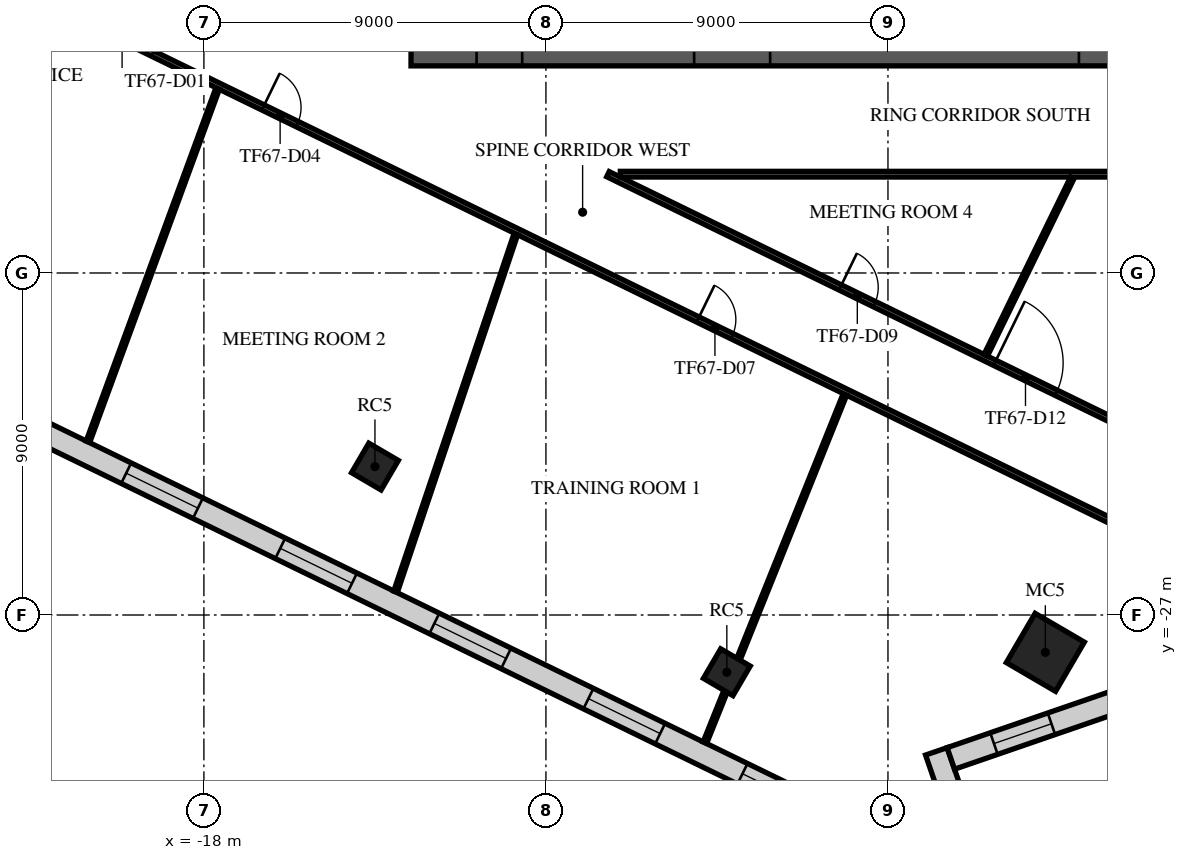
"""IFC4 building model, lengths in metres.
Left out: names, types, materials, properties, quantities, classifications, styles, units other than length and angle.
Written with IfcOpenShell. Run it as: python <this file> out.ifc"""

import sys

from ifc_helpers import new_model, si_unit, direction, frame, frame_2d, origin, origin_2d, place, context, subcontext, project, spatial, rectangle, extrude, element, fill, save


model = new_model("IFC4")
c1 = context("Model", 3, precision=1e-05, world=origin(), true_north=direction((0.0, 1.0)))
c2 = subcontext(c1, "Body", "Model", "MODEL_VIEW")
j1 = project(units=[si_unit("LENGTHUNIT", "METRE"), si_unit("PLANEANGLEUNIT", "RADIAN")], contexts=[c1])
p1 = place(None, origin())
s1 = spatial("IfcSite", under=j1, at=p1, CompositionType="ELEMENT")
p2 = place(p1, origin())
s2 = spatial("IfcBuilding", under=s1, at=p2, CompositionType="ELEMENT")
p3 = place(p2, frame((0.0, 0.0, 282.9)))
s3 = spatial("IfcBuildingStorey", under=s2, at=p3, CompositionType="ELEMENT", Elevation=282.9)
for number, where, z_axis, x_axis in (
    (1, (-13.499, -23.094, 0.0), (0.0, 0.0, 1.0), (0.505, 0.863, 0.0)),
    (2, (-4.24, -28.506, 0.0), (0.0, 0.0, 1.0), (0.505, 0.863, 0.0)),
):
    element("IfcColumn", number, at=place(p3, frame(where, z_axis=z_axis, x_axis=x_axis)), inside=s3, PredefinedType="COLUMN", context=c2, shape_type="SweptSolid", body=[
        extrude(rectangle(XDim=0.9, YDim=0.9, at=origin_2d()), origin(), (0.0, 0.0, 1.0), 4.0),
    ])
p4 = place(p3, frame((4.141, -27.983, 0.0), z_axis=(0.0, 0.0, 1.0), x_axis=(0.504643651291, 0.863327739165, 0.0)))
e3 = element("IfcColumn", 3, at=p4, inside=s3, PredefinedType="COLUMN", context=c2, shape_type="SweptSolid", body=[
    extrude(rectangle(XDim=1.5, YDim=1.5, at=origin_2d()), origin(), (0.0, 0.0, 1.0), 4.0),
])
p5 = place(p3, frame((-12.55, -12.175, 0.0), z_axis=(0.0, 0.0, 1.0), x_axis=(1.0, 0.0, 0.0)))
e4 = element("IfcWall", 4, at=p5, inside=s3, PredefinedType="SHEAR", context=c2, shape_type="SweptSolid", body=[
    extrude(rectangle(XDim=25.1, YDim=0.75, at=frame_2d((12.55, 0.0))), origin(), (0.0, 0.0, 1.0), 3.64),
])
p6 = place(p5, frame((7.45, 0.0, 0.0)))
e5 = element("IfcOpeningElement", 5, at=p6, cuts=e4, PredefinedType="OPENING", context=c2, shape_type="SweptSolid", body=[
    extrude(rectangle(XDim=2.0, YDim=2.1, at=frame_2d((1.0, 1.05))), frame((0.0, 0.385, 0.0), z_axis=(0.0, -1.0, 0.0), x_axis=(1.0, 0.0, 0.0)), (0.0, 0.0, 1.0), 0.77),
])
p7 = place(p5, frame((17.575, 0.0, 0.0)))
e6 = element("IfcOpeningElement", 6, at=p7, cuts=e4, PredefinedType="OPENING", context=c2, shape_type="SweptSolid", body=[
    extrude(rectangle(XDim=1.2, YDim=2.1, at=frame_2d((0.6, 1.05))), frame((0.0, 0.385, 0.0), z_axis=(0.0, -1.0, 0.0), x_axis=(1.0, 0.0, 0.0)), (0.0, 0.0, 1.0), 0.77),
])
p8 = place(p5, frame((1.725, 0.0, 0.0)))
e7 = element("IfcOpeningElement", 7, at=p8, cuts=e4, PredefinedType="OPENING", context=c2, shape_type="SweptSolid", body=[
    extrude(rectangle(XDim=1.2, YDim=2.1, at=frame_2d((0.6, 1.05))), frame((0.0, 0.385, 0.0), z_axis=(0.0, -1.0, 0.0), x_axis=(1.0, 0.0, 0.0)), (0.0, 0.0, 1.0), 0.77),
])
p9 = place(p5, frame((22.175, 0.0, 0.0)))
e8 = element("IfcOpeningElement", 8, at=p9, cuts=e4, PredefinedType="OPENING", context=c2, shape_type="SweptSolid", body=[
    extrude(rectangle(XDim=1.2, YDim=2.1, at=frame_2d((0.6, 1.05))), frame((0.0, 0.385, 0.0), z_axis=(0.0, -1.0, 0.0), x_axis=(1.0, 0.0, 0.0)), (0.0, 0.0, 1.0), 0.77),
])
p10 = place(p3, frame((-29.237, -18.785, 0.0), z_axis=(0.0, 0.0, 1.0), x_axis=(0.898796077823, -0.438366981524, 0.0)))
e9 = element("IfcWall", 9, at=p10, inside=s3, PredefinedType="STANDARD", context=c2, shape_type="SweptSolid", body=[
    extrude(rectangle(XDim=36.086, YDim=0.6, at=frame_2d((18.043, 0.0))), origin(), (0.0, 0.0, 1.0), 3.64),
])
p11 = place(p10, frame((1.205, 0.0, 0.9)))
e10 = element("IfcOpeningElement", 10, at=p11, cuts=e9, PredefinedType="OPENING", context=c2, shape_type="SweptSolid", body=[
    extrude(rectangle(XDim=2.1, YDim=2.1, at=frame_2d((1.05, 1.05))), frame((0.0, 0.31, 0.0), z_axis=(0.0, -1.0, 0.0), x_axis=(1.0, 0.0, 0.0)), (0.0, 0.0, 1.0), 0.62),
])
p12 = place(p10, frame((5.716, 0.0, 0.9)))
e11 = element("IfcOpeningElement", 11, at=p12, cuts=e9, PredefinedType="OPENING", context=c2, shape_type="SweptSolid", body=[
    extrude(rectangle(XDim=2.1, YDim=2.1, at=frame_2d((1.05, 1.05))), frame((0.0, 0.31, 0.0), z_axis=(0.0, -1.0, 0.0), x_axis=(1.0, 0.0, 0.0)), (0.0, 0.0, 1.0), 0.62),
])
p13 = place(p10, frame((10.227, 0.0, 0.9)))
e12 = element("IfcOpeningElement", 12, at=p13, cuts=e9, PredefinedType="OPENING", context=c2, shape_type="SweptSolid", body=[
    extrude(rectangle(XDim=2.1, YDim=2.1, at=frame_2d((1.05, 1.05))), frame((0.0, 0.31, 0.0), z_axis=(0.0, -1.0, 0.0), x_axis=(1.0, 0.0, 0.0)), (0.0, 0.0, 1.0), 0.62),
])
p14 = place(p10, frame((14.738, 0.0, 0.9)))
e13 = element("IfcOpeningElement", 13, at=p14, cuts=e9, PredefinedType="OPENING", context=c2, shape_type="SweptSolid", body=[
    extrude(rectangle(XDim=2.1, YDim=2.1, at=frame_2d((1.05, 1.05))), frame((0.0, 0.31, 0.0), z_axis=(0.0, -1.0, 0.0), x_axis=(1.0, 0.0, 0.0)), (0.0, 0.0, 1.0), 0.62),
])
p15 = place(p10, frame((19.249, 0.0, 0.9)))
e14 = element("IfcOpeningElement", 14, at=p15, cuts=e9, PredefinedType="OPENING", context=c2, shape_type="SweptSolid", body=[
    extrude(rectangle(XDim=2.1, YDim=2.1, at=frame_2d((1.05, 1.05))), frame((0.0, 0.31, 0.0), z_axis=(0.0, -1.0, 0.0), x_axis=(1.0, 0.0, 0.0)), (0.0, 0.0, 1.0), 0.62),
])
p16 = place(p10, frame((23.759, 0.0, 0.9)))
e15 = element("IfcOpeningElement", 15, at=p16, cuts=e9, PredefinedType="OPENING", context=c2, shape_type="SweptSolid", body=[
    extrude(rectangle(XDim=2.1, YDim=2.1, at=frame_2d((1.05, 1.05))), frame((0.0, 0.31, 0.0), z_axis=(0.0, -1.0, 0.0), x_axis=(1.0, 0.0, 0.0)), (0.0, 0.0, 1.0), 0.62),
])
p17 = place(p10, frame((28.27, 0.0, 0.9)))
e16 = element("IfcOpeningElement", 16, at=p17, cuts=e9, PredefinedType="OPENING", context=c2, shape_type="SweptSolid", body=[
    extrude(rectangle(XDim=2.1, YDim=2.1, at=frame_2d((1.05, 1.05))), frame((0.0, 0.31, 0.0), z_axis=(0.0, -1.0, 0.0), x_axis=(1.0, 0.0, 0.0)), (0.0, 0.0, 1.0), 0.62),
])
p18 = place(p10, frame((32.781, 0.0, 0.9)))
e17 = element("IfcOpeningElement", 17, at=p18, cuts=e9, PredefinedType="OPENING", context=c2, shape_type="SweptSolid", body=[
    extrude(rectangle(XDim=2.1, YDim=2.1, at=frame_2d((1.05, 1.05))), frame((0.0, 0.31, 0.0), z_axis=(0.0, -1.0, 0.0), x_axis=(1.0, 0.0, 0.0)), (0.0, 0.0, 1.0), 0.62),
])
p19 = place(p3, frame((2.782, -34.971, 0.0), z_axis=(0.0, 0.0, 1.0), x_axis=(-0.325534552764, 0.945530144922, 0.0)))
e18 = element("IfcWall", 18, at=p19, inside=s3, PredefinedType="STANDARD", context=c2, shape_type="SweptSolid", body=[
    extrude(rectangle(XDim=4.635, YDim=0.6, at=frame_2d((2.318, 0.0))), origin(), (0.0, 0.0, 1.0), 3.64),
])
p20 = place(p19, frame((1.218, 0.0, 0.9)))
e19 = element("IfcOpeningElement", 19, at=p20, cuts=e18, PredefinedType="OPENING", context=c2, shape_type="SweptSolid", body=[
    extrude(rectangle(XDim=1.6, YDim=2.1, at=frame_2d((0.8, 1.05))), frame((0.0, 0.31, 0.0), z_axis=(0.0, -1.0, 0.0), x_axis=(1.0, 0.0, 0.0)), (0.0, 0.0, 1.0), 0.62),
])
p21 = place(p3, frame((1.654, -30.774, 0.0), z_axis=(0.0, 0.0, 1.0), x_axis=(0.945512022477, 0.325587185483, 0.0)))
e20 = element("IfcWall", 20, at=p21, inside=s3, PredefinedType="STANDARD", context=c2, shape_type="SweptSolid", body=[
    extrude(rectangle(XDim=8.0, YDim=0.6, at=frame_2d((4.0, 0.0))), origin(), (0.0, 0.0, 1.0), 3.64),
])
p22 = place(p21, frame((1.2, 0.0, 0.9)))
e21 = element("IfcOpeningElement", 21, at=p22, cuts=e20, PredefinedType="OPENING", context=c2, shape_type="SweptSolid", body=[
    extrude(rectangle(XDim=1.6, YDim=2.1, at=frame_2d((0.8, 1.05))), frame((0.0, 0.31, 0.0), z_axis=(0.0, -1.0, 0.0), x_axis=(1.0, 0.0, 0.0)), (0.0, 0.0, 1.0), 0.62),
])
p23 = place(p21, frame((5.2, 0.0, 0.9)))
e22 = element("IfcOpeningElement", 22, at=p23, cuts=e20, PredefinedType="OPENING", context=c2, shape_type="SweptSolid", body=[
    extrude(rectangle(XDim=1.6, YDim=2.1, at=frame_2d((0.8, 1.05))), frame((0.0, 0.31, 0.0), z_axis=(0.0, -1.0, 0.0), x_axis=(1.0, 0.0, 0.0)), (0.0, 0.0, 1.0), 0.62),
])
p24 = place(p3, frame((-26.175, -8.898, 0.0), z_axis=(0.0, 0.0, 1.0), x_axis=(0.898795233888, -0.438368711864, 0.0)))
e23 = element("IfcWall", 23, at=p24, inside=s3, PredefinedType="PARTITIONING", context=c2, shape_type="SweptSolid", body=[
    extrude(rectangle(XDim=39.325, YDim=0.15, at=frame_2d((19.663, 0.0))), origin(), (0.0, 0.0, 1.0), 3.04),
])
p25 = place(p24, frame((5.8, 0.0, 0.0)))
e24 = element("IfcOpeningElement", 24, at=p25, cuts=e23, PredefinedType="OPENING", context=c2, shape_type="SweptSolid", body=[
    extrude(rectangle(XDim=1.8, YDim=2.1, at=frame_2d((0.9, 1.05))), frame((0.0, 0.085, 0.0), z_axis=(0.0, -1.0, 0.0), x_axis=(1.0, 0.0, 0.0)), (0.0, 0.0, 1.0), 0.17),
])
p26 = place(p24, frame((10.827, 0.0, 0.0)))
e25 = element("IfcOpeningElement", 25, at=p26, cuts=e23, PredefinedType="OPENING", context=c2, shape_type="SweptSolid", body=[
    extrude(rectangle(XDim=1.0, YDim=2.1, at=frame_2d((0.5, 1.05))), frame((0.0, 0.085, 0.0), z_axis=(0.0, -1.0, 0.0), x_axis=(1.0, 0.0, 0.0)), (0.0, 0.0, 1.0), 0.17),
])
p27 = place(p24, frame((23.556, 0.0, 0.0)))
e26 = element("IfcOpeningElement", 26, at=p27, cuts=e23, PredefinedType="OPENING", context=c2, shape_type="SweptSolid", body=[
    extrude(rectangle(XDim=1.0, YDim=2.1, at=frame_2d((0.5, 1.05))), frame((0.0, 0.085, 0.0), z_axis=(0.0, -1.0, 0.0), x_axis=(1.0, 0.0, 0.0)), (0.0, 0.0, 1.0), 0.17),
])
p28 = place(p3, frame((-7.368, -15.4, 0.0), z_axis=(0.0, 0.0, 1.0), x_axis=(0.898784749485, -0.438390207571, 0.0)))
e27 = element("IfcWall", 27, at=p28, inside=s3, PredefinedType="PARTITIONING", context=c2, shape_type="SweptSolid", body=[
    extrude(rectangle(XDim=19.572, YDim=0.15, at=frame_2d((9.786, 0.0))), origin(), (0.0, 0.0, 1.0), 3.04),
])
p29 = place(p28, frame((6.8, 0.0, 0.0)))
e28 = element("IfcOpeningElement", 28, at=p29, cuts=e27, PredefinedType="OPENING", context=c2, shape_type="SweptSolid", body=[
    extrude(rectangle(XDim=1.0, YDim=2.1, at=frame_2d((0.5, 1.05))), frame((0.0, 0.085, 0.0), z_axis=(0.0, -1.0, 0.0), x_axis=(1.0, 0.0, 0.0)), (0.0, 0.0, 1.0), 0.17),
])
p30 = place(p28, frame((11.324, 0.0, 0.0)))
e29 = element("IfcOpeningElement", 29, at=p30, cuts=e27, PredefinedType="OPENING", context=c2, shape_type="SweptSolid", body=[
    extrude(rectangle(XDim=1.8, YDim=2.1, at=frame_2d((0.9, 1.05))), frame((0.0, 0.085, 0.0), z_axis=(0.0, -1.0, 0.0), x_axis=(1.0, 0.0, 0.0)), (0.0, 0.0, 1.0), 0.17),
])
p31 = place(p3, frame((-7.043, -15.4, 0.0), z_axis=(0.0, 0.0, 1.0), x_axis=(1.0, 0.0, 0.0)))
e30 = element("IfcWall", 30, at=p31, inside=s3, PredefinedType="PARTITIONING", context=c2, shape_type="SweptSolid", body=[
    extrude(rectangle(XDim=22.443, YDim=0.15, at=frame_2d((11.222, 0.0))), origin(), (0.0, 0.0, 1.0), 3.24),
])
p32 = place(p3, frame((-21.051, -22.441, 0.0), z_axis=(0.0, 0.0, 1.0), x_axis=(0.344611208879, 0.938745500503, 0.0)))
e31 = element("IfcWall", 31, at=p32, inside=s3, PredefinedType="PARTITIONING", context=c2, shape_type="SweptSolid", body=[
    extrude(rectangle(XDim=9.898, YDim=0.1, at=frame_2d((4.949, 0.0))), origin(), (0.0, 0.0, 1.0), 3.04),
])
p33 = place(p3, frame((-12.957, -26.389, 0.0), z_axis=(0.0, 0.0, 1.0), x_axis=(0.318735029826, 0.947843858851, 0.0)))
e32 = element("IfcWall", 32, at=p33, inside=s3, PredefinedType="PARTITIONING", context=c2, shape_type="SweptSolid", body=[
    extrude(rectangle(XDim=9.928, YDim=0.1, at=frame_2d((4.964, 0.0))), origin(), (0.0, 0.0, 1.0), 3.04),
])
p34 = place(p3, frame((-4.817, -30.359, 0.0), z_axis=(0.0, 0.0, 1.0), x_axis=(0.373182072461, 0.927758126234, 0.0)))
e33 = element("IfcWall", 33, at=p34, inside=s3, PredefinedType="PARTITIONING", context=c2, shape_type="SweptSolid", body=[
    extrude(rectangle(XDim=1.456, YDim=0.1, at=frame_2d((0.728, 0.0))), origin(), (0.0, 0.0, 1.0), 3.64),
])
p35 = place(p3, frame((-3.934, -28.164, 0.0), z_axis=(0.0, 0.0, 1.0), x_axis=(0.373060891907, 0.92780686079, 0.0)))
e34 = element("IfcWall", 34, at=p35, inside=s3, PredefinedType="PARTITIONING", context=c2, shape_type="SweptSolid", body=[
    extrude(rectangle(XDim=7.508, YDim=0.1, at=frame_2d((3.754, 0.0))), origin(), (0.0, 0.0, 1.0), 3.24),
])
p36 = place(p3, frame((2.573, -20.166, 0.0), z_axis=(0.0, 0.0, 1.0), x_axis=(0.438298611435, 0.898829420532, 0.0)))
e35 = element("IfcWall", 35, at=p36, inside=s3, PredefinedType="PARTITIONING", context=c2, shape_type="SweptSolid", body=[
    extrude(rectangle(XDim=5.194, YDim=0.1, at=frame_2d((2.597, 0.0))), origin(), (0.0, 0.0, 1.0), 3.24),
])
p37 = place(p6, origin())
e36 = element("IfcDoor", 36, at=p37, inside=s3, OperationType="SINGLE_SWING_LEFT", PredefinedType="DOOR", context=c2, shape_type="SweptSolid", body=[
    extrude(rectangle(XDim=2.0, YDim=2.1, at=frame_2d((1.0, 1.05))), frame((0.0, 0.025, 0.0), z_axis=(0.0, -1.0, 0.0), x_axis=(1.0, 0.0, 0.0)), (0.0, 0.0, 1.0), 0.05),
])
fill(e5, e36)
p38 = place(p7, origin())
e37 = element("IfcDoor", 37, at=p38, inside=s3, OperationType="SINGLE_SWING_LEFT", PredefinedType="DOOR", context=c2, shape_type="SweptSolid", body=[
    extrude(rectangle(XDim=1.2, YDim=2.1, at=frame_2d((0.6, 1.05))), frame((0.0, 0.025, 0.0), z_axis=(0.0, -1.0, 0.0), x_axis=(1.0, 0.0, 0.0)), (0.0, 0.0, 1.0), 0.05),
])
fill(e6, e37)
p39 = place(p8, origin())
e38 = element("IfcDoor", 38, at=p39, inside=s3, OperationType="SINGLE_SWING_LEFT", PredefinedType="DOOR", context=c2, shape_type="SweptSolid", body=[
    extrude(rectangle(XDim=1.2, YDim=2.1, at=frame_2d((0.6, 1.05))), frame((0.0, 0.025, 0.0), z_axis=(0.0, -1.0, 0.0), x_axis=(1.0, 0.0, 0.0)), (0.0, 0.0, 1.0), 0.05),
])
fill(e7, e38)
p40 = place(p13, origin())
e39 = element("IfcWindow", 39, at=p40, inside=s3, PartitioningType="SINGLE_PANEL", PredefinedType="WINDOW", context=c2, shape_type="SweptSolid", body=[
    extrude(rectangle(XDim=2.1, YDim=2.1, at=frame_2d((1.05, 1.05))), frame((0.0, 0.03, 0.0), z_axis=(0.0, -1.0, 0.0), x_axis=(1.0, 0.0, 0.0)), (0.0, 0.0, 1.0), 0.06),
])
fill(e12, e39)
p41 = place(p14, origin())
e40 = element("IfcWindow", 40, at=p41, inside=s3, PartitioningType="SINGLE_PANEL", PredefinedType="WINDOW", context=c2, shape_type="SweptSolid", body=[
    extrude(rectangle(XDim=2.1, YDim=2.1, at=frame_2d((1.05, 1.05))), frame((0.0, 0.03, 0.0), z_axis=(0.0, -1.0, 0.0), x_axis=(1.0, 0.0, 0.0)), (0.0, 0.0, 1.0), 0.06),
])
fill(e13, e40)
p42 = place(p15, origin())
e41 = element("IfcWindow", 41, at=p42, inside=s3, PartitioningType="SINGLE_PANEL", PredefinedType="WINDOW", context=c2, shape_type="SweptSolid", body=[
    extrude(rectangle(XDim=2.1, YDim=2.1, at=frame_2d((1.05, 1.05))), frame((0.0, 0.03, 0.0), z_axis=(0.0, -1.0, 0.0), x_axis=(1.0, 0.0, 0.0)), (0.0, 0.0, 1.0), 0.06),
])
fill(e14, e41)
p43 = place(p16, origin())
e42 = element("IfcWindow", 42, at=p43, inside=s3, PartitioningType="SINGLE_PANEL", PredefinedType="WINDOW", context=c2, shape_type="SweptSolid", body=[
    extrude(rectangle(XDim=2.1, YDim=2.1, at=frame_2d((1.05, 1.05))), frame((0.0, 0.03, 0.0), z_axis=(0.0, -1.0, 0.0), x_axis=(1.0, 0.0, 0.0)), (0.0, 0.0, 1.0), 0.06),
])
fill(e15, e42)
p44 = place(p17, origin())
e43 = element("IfcWindow", 43, at=p44, inside=s3, PartitioningType="SINGLE_PANEL", PredefinedType="WINDOW", context=c2, shape_type="SweptSolid", body=[
    extrude(rectangle(XDim=2.1, YDim=2.1, at=frame_2d((1.05, 1.05))), frame((0.0, 0.03, 0.0), z_axis=(0.0, -1.0, 0.0), x_axis=(1.0, 0.0, 0.0)), (0.0, 0.0, 1.0), 0.06),
])
fill(e16, e43)
p45 = place(p22, origin())
e44 = element("IfcWindow", 44, at=p45, inside=s3, PartitioningType="SINGLE_PANEL", PredefinedType="WINDOW", context=c2, shape_type="SweptSolid", body=[
    extrude(rectangle(XDim=1.6, YDim=2.1, at=frame_2d((0.8, 1.05))), frame((0.0, 0.03, 0.0), z_axis=(0.0, -1.0, 0.0), x_axis=(1.0, 0.0, 0.0)), (0.0, 0.0, 1.0), 0.06),
])
fill(e21, e44)
p46 = place(p25, frame((1.8, 0.0, 0.0), z_axis=(0.0, 0.0, 1.0), x_axis=(-1.0, 0.0, 0.0)))
e45 = element("IfcDoor", 45, at=p46, inside=s3, OperationType="DOUBLE_DOOR_SINGLE_SWING", PredefinedType="DOOR", context=c2, shape_type="SweptSolid", body=[
    extrude(rectangle(XDim=1.8, YDim=2.1, at=frame_2d((0.9, 1.05))), frame((0.0, 0.025, 0.0), z_axis=(0.0, -1.0, 0.0), x_axis=(1.0, 0.0, 0.0)), (0.0, 0.0, 1.0), 0.05),
])
fill(e24, e45)
p47 = place(p26, frame((1.0, 0.0, 0.0), z_axis=(0.0, 0.0, 1.0), x_axis=(-1.0, 0.0, 0.0)))
e46 = element("IfcDoor", 46, at=p47, inside=s3, OperationType="SINGLE_SWING_RIGHT", PredefinedType="DOOR", context=c2, shape_type="SweptSolid", body=[
    extrude(rectangle(XDim=1.0, YDim=2.1, at=frame_2d((0.5, 1.05))), frame((0.0, 0.025, 0.0), z_axis=(0.0, -1.0, 0.0), x_axis=(1.0, 0.0, 0.0)), (0.0, 0.0, 1.0), 0.05),
])
fill(e25, e46)
p48 = place(p27, frame((1.0, 0.0, 0.0), z_axis=(0.0, 0.0, 1.0), x_axis=(-1.0, 0.0, 0.0)))
e47 = element("IfcDoor", 47, at=p48, inside=s3, OperationType="SINGLE_SWING_LEFT", PredefinedType="DOOR", context=c2, shape_type="SweptSolid", body=[
    extrude(rectangle(XDim=1.0, YDim=2.1, at=frame_2d((0.5, 1.05))), frame((0.0, 0.025, 0.0), z_axis=(0.0, -1.0, 0.0), x_axis=(1.0, 0.0, 0.0)), (0.0, 0.0, 1.0), 0.05),
])
fill(e26, e47)
p49 = place(p29, origin())
e48 = element("IfcDoor", 48, at=p49, inside=s3, OperationType="SINGLE_SWING_LEFT", PredefinedType="DOOR", context=c2, shape_type="SweptSolid", body=[
    extrude(rectangle(XDim=1.0, YDim=2.1, at=frame_2d((0.5, 1.05))), frame((0.0, 0.025, 0.0), z_axis=(0.0, -1.0, 0.0), x_axis=(1.0, 0.0, 0.0)), (0.0, 0.0, 1.0), 0.05),
])
fill(e28, e48)
p50 = place(p30, origin())
e49 = element("IfcDoor", 49, at=p50, inside=s3, OperationType="DOUBLE_DOOR_SINGLE_SWING", PredefinedType="DOOR", context=c2, shape_type="SweptSolid", body=[
    extrude(rectangle(XDim=1.8, YDim=2.1, at=frame_2d((0.9, 1.05))), frame((0.0, 0.025, 0.0), z_axis=(0.0, -1.0, 0.0), x_axis=(1.0, 0.0, 0.0)), (0.0, 0.0, 1.0), 0.05),
])
fill(e29, e49)
save(model, sys.argv[1])
